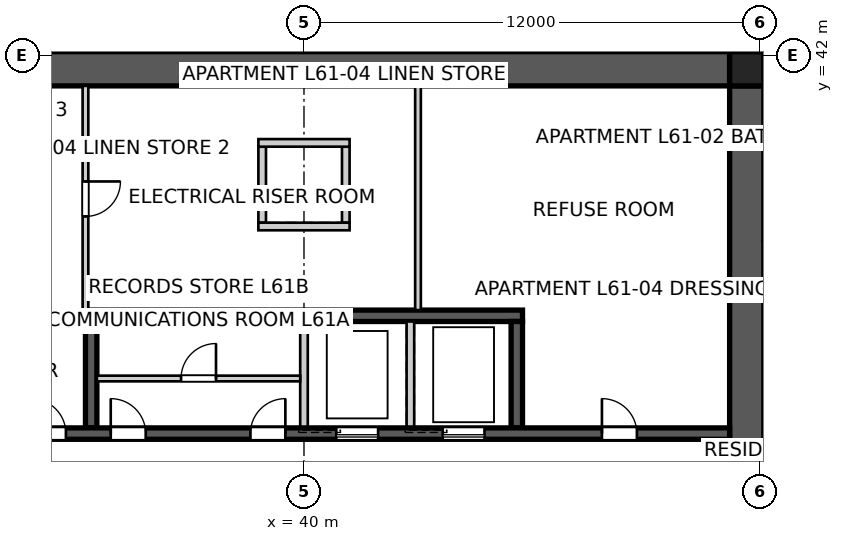
"""IFC4 building model, lengths in metres.
Left out: names, types, materials, properties, quantities, classifications, styles, units other than length and angle.
Written with IfcOpenShell. Run it as: python <this file> out.ifc"""

import sys

from ifc_helpers import new_model, si_unit, direction, frame, frame_2d, origin, origin_2d, place, context, subcontext, project, spatial, polyline, rectangle, outline, extrude, element, fill, save


model = new_model("IFC4")
c1 = context("Model", 3, precision=1e-05, world=origin(), true_north=direction((0.0, 1.0)))
c2 = subcontext(c1, "Body", "Model", "MODEL_VIEW")
j1 = project(units=[si_unit("LENGTHUNIT", "METRE"), si_unit("PLANEANGLEUNIT", "RADIAN")], contexts=[c1])
p1 = place(None, origin())
s1 = spatial("IfcSite", under=j1, at=p1, CompositionType="ELEMENT")
p2 = place(p1, origin())
s2 = spatial("IfcBuilding", under=s1, at=p2, CompositionType="ELEMENT")
p3 = place(p2, frame((0.0, 0.0, 221.8)))
s3 = spatial("IfcBuildingStorey", under=s2, at=p3, CompositionType="ELEMENT", Elevation=221.8)
p4 = place(p3, frame((28.8, 41.65, 0.0), z_axis=(0.0, 0.0, 1.0), x_axis=(1.0, 0.0, 0.0)))
e1 = element("IfcWall", 1, at=p4, inside=s3, PredefinedType="SHEAR", context=c2, shape_type="SweptSolid", body=[
    extrude(outline(polyline([(0.0, -0.45), (22.4, -0.45), (22.4, -0.025), (22.85, -0.025), (22.85, 0.025), (22.4, 0.025), (22.4, 0.45), (0.0, 0.45), (0.0, 0.025), (-0.45, 0.025), (-0.45, -0.025), (0.0, -0.025), (0.0, -0.45)])), origin(), (0.0, 0.0, 1.0), 3.4),
])
p5 = place(p3, frame((51.65, 18.8, 0.0), z_axis=(0.0, 0.0, 1.0), x_axis=(0.0, 1.0, 0.0)))
e2 = element("IfcWall", 2, at=p5, inside=s3, PredefinedType="SHEAR", context=c2, shape_type="SweptSolid", body=[
    extrude(outline(polyline([(0.0, -0.45), (22.4, -0.45), (22.4, -0.025), (22.85, -0.025), (22.85, 0.025), (22.4, 0.025), (22.4, 0.45), (0.0, 0.45), (0.0, 0.025), (-0.45, 0.025), (-0.45, -0.025), (0.0, -0.025), (0.0, -0.45)])), origin(), (0.0, 0.0, 1.0), 3.4),
])
p6 = place(p5, frame((11.14, 0.0, 0.0)))
e3 = element("IfcOpeningElement", 3, at=p6, cuts=e2, PredefinedType="OPENING", context=c2, shape_type="SweptSolid", body=[
    extrude(rectangle(XDim=1.02, YDim=2.4, at=frame_2d((0.51, 1.2))), frame((0.0, 0.46, 0.0), z_axis=(0.0, -1.0, 0.0), x_axis=(1.0, 0.0, 0.0)), (0.0, 0.0, 1.0), 0.92),
])
p7 = place(p3, frame((28.8, 32.05, 0.0), z_axis=(0.0, 0.0, 1.0), x_axis=(1.0, 0.0, 0.0)))
e4 = element("IfcWall", 4, at=p7, inside=s3, PredefinedType="SHEAR", context=c2, shape_type="SweptSolid", body=[
    extrude(rectangle(XDim=22.4, YDim=0.3, at=frame_2d((11.2, 0.0))), origin(), (0.0, 0.0, 1.0), 3.4),
])
p8 = place(p7, frame((19.04, 0.0, 0.0)))
e5 = element("IfcOpeningElement", 5, at=p8, cuts=e4, PredefinedType="OPENING", context=c2, shape_type="SweptSolid", body=[
    extrude(rectangle(XDim=0.92, YDim=2.1, at=frame_2d((0.46, 1.05))), frame((0.0, 0.16, 0.0), z_axis=(0.0, -1.0, 0.0), x_axis=(1.0, 0.0, 0.0)), (0.0, 0.0, 1.0), 0.32),
])
p9 = place(p7, frame((1.265, 0.0, 0.0)))
e6 = element("IfcOpeningElement", 6, at=p9, cuts=e4, PredefinedType="OPENING", context=c2, shape_type="SweptSolid", body=[
    extrude(rectangle(XDim=1.02, YDim=2.1, at=frame_2d((0.51, 1.05))), frame((0.0, 0.16, 0.0), z_axis=(0.0, -1.0, 0.0), x_axis=(1.0, 0.0, 0.0)), (0.0, 0.0, 1.0), 0.32),
])
p10 = place(p7, frame((4.015, 0.0, 0.0)))
e7 = element("IfcOpeningElement", 7, at=p10, cuts=e4, PredefinedType="OPENING", context=c2, shape_type="SweptSolid", body=[
    extrude(rectangle(XDim=0.92, YDim=2.1, at=frame_2d((0.46, 1.05))), frame((0.0, 0.16, 0.0), z_axis=(0.0, -1.0, 0.0), x_axis=(1.0, 0.0, 0.0)), (0.0, 0.0, 1.0), 0.32),
])
p11 = place(p7, frame((6.115, 0.0, 0.0)))
e8 = element("IfcOpeningElement", 8, at=p11, cuts=e4, PredefinedType="OPENING", context=c2, shape_type="SweptSolid", body=[
    extrude(rectangle(XDim=0.92, YDim=2.1, at=frame_2d((0.46, 1.05))), frame((0.0, 0.16, 0.0), z_axis=(0.0, -1.0, 0.0), x_axis=(1.0, 0.0, 0.0)), (0.0, 0.0, 1.0), 0.32),
])
p12 = place(p7, frame((9.79, 0.0, 0.0)))
e9 = element("IfcOpeningElement", 9, at=p12, cuts=e4, PredefinedType="OPENING", context=c2, shape_type="SweptSolid", body=[
    extrude(rectangle(XDim=0.92, YDim=2.1, at=frame_2d((0.46, 1.05))), frame((0.0, 0.16, 0.0), z_axis=(0.0, -1.0, 0.0), x_axis=(1.0, 0.0, 0.0)), (0.0, 0.0, 1.0), 0.32),
])
p13 = place(p7, frame((12.05, 0.0, 0.0)))
e10 = element("IfcOpeningElement", 10, at=p13, cuts=e4, PredefinedType="OPENING", context=c2, shape_type="SweptSolid", body=[
    extrude(rectangle(XDim=1.1, YDim=2.1, at=frame_2d((0.55, 1.05))), frame((0.0, 0.16, 0.0), z_axis=(0.0, -1.0, 0.0), x_axis=(1.0, 0.0, 0.0)), (0.0, 0.0, 1.0), 0.32),
])
p14 = place(p7, frame((14.85, 0.0, 0.0)))
e11 = element("IfcOpeningElement", 11, at=p14, cuts=e4, PredefinedType="OPENING", context=c2, shape_type="SweptSolid", body=[
    extrude(rectangle(XDim=1.1, YDim=2.1, at=frame_2d((0.55, 1.05))), frame((0.0, 0.16, 0.0), z_axis=(0.0, -1.0, 0.0), x_axis=(1.0, 0.0, 0.0)), (0.0, 0.0, 1.0), 0.32),
])
p15 = place(p3, frame((34.25, 35.15, 0.0), z_axis=(0.0, 0.0, 1.0), x_axis=(1.0, 0.0, 0.0)))
e12 = element("IfcWall", 12, at=p15, inside=s3, PredefinedType="SHEAR", context=c2, shape_type="SweptSolid", body=[
    extrude(rectangle(XDim=11.5, YDim=0.3, at=frame_2d((5.75, 0.0))), origin(), (0.0, 0.0, 1.0), 3.4),
])
p16 = place(p3, frame((34.4, 32.2, 0.0), z_axis=(0.0, 0.0, 1.0), x_axis=(0.0, 1.0, 0.0)))
e13 = element("IfcWall", 13, at=p16, inside=s3, PredefinedType="SHEAR", context=c2, shape_type="SweptSolid", body=[
    extrude(rectangle(XDim=2.8, YDim=0.3, at=frame_2d((1.4, 0.0))), origin(), (0.0, 0.0, 1.0), 3.4),
])
for number, where, z_axis, x_axis in (
    (14, (40.0, 32.2, 0.0), (0.0, 0.0, 1.0), (0.0, 1.0, 0.0)),
    (15, (42.8, 32.2, 0.0), (0.0, 0.0, 1.0), (0.0, 1.0, 0.0)),
):
    element("IfcWall", number, at=place(p3, frame(where, z_axis=z_axis, x_axis=x_axis)), inside=s3, PredefinedType="SOLIDWALL", context=c2, shape_type="SweptSolid", body=[
        extrude(rectangle(XDim=2.8, YDim=0.2, at=frame_2d((1.4, 0.0))), origin(), (0.0, 0.0, 1.0), 3.4),
    ])
p17 = place(p3, frame((45.6, 32.2, 0.0), z_axis=(0.0, 0.0, 1.0), x_axis=(0.0, 1.0, 0.0)))
e16 = element("IfcWall", 16, at=p17, inside=s3, PredefinedType="SHEAR", context=c2, shape_type="SweptSolid", body=[
    extrude(rectangle(XDim=2.8, YDim=0.3, at=frame_2d((1.4, 0.0))), origin(), (0.0, 0.0, 1.0), 3.4),
])
for number, where, z_axis, x_axis in (
    (17, (38.9, 37.6, 0.0), (0.0, 0.0, 1.0), (0.0, 1.0, 0.0)),
    (18, (41.1, 37.6, 0.0), (0.0, 0.0, 1.0), (0.0, 1.0, 0.0)),
):
    element("IfcWall", number, at=place(p3, frame(where, z_axis=z_axis, x_axis=x_axis)), inside=s3, PredefinedType="SOLIDWALL", context=c2, shape_type="SweptSolid", body=[
        extrude(rectangle(XDim=2.0, YDim=0.2, at=frame_2d((1.0, 0.0))), origin(), (0.0, 0.0, 1.0), 3.4),
    ])
for number, where, z_axis, x_axis in (
    (19, (38.8, 37.5, 0.0), (0.0, 0.0, 1.0), (1.0, 0.0, 0.0)),
    (20, (38.8, 39.7, 0.0), (0.0, 0.0, 1.0), (1.0, 0.0, 0.0)),
):
    element("IfcWall", number, at=place(p3, frame(where, z_axis=z_axis, x_axis=x_axis)), inside=s3, PredefinedType="SOLIDWALL", context=c2, shape_type="SweptSolid", body=[
        extrude(rectangle(XDim=2.4, YDim=0.2, at=frame_2d((1.2, 0.0))), origin(), (0.0, 0.0, 1.0), 3.4),
    ])
p18 = place(p3, frame((51.65, 41.65, 0.0), z_axis=(0.0, 0.0, 1.0), x_axis=(1.0, 0.0, 0.0)))
e21 = element("IfcColumn", 21, at=p18, inside=s3, PredefinedType="COLUMN", context=c2, shape_type="SweptSolid", body=[
    extrude(rectangle(XDim=0.9, YDim=0.9, at=origin_2d()), origin(), (0.0, 0.0, 1.0), 3.4),
])
p19 = place(p3, frame((59.486, 41.25, 0.0), z_axis=(0.0, 0.0, 1.0), x_axis=(-0.866020489494, -0.500008511703, 0.0)))
e22 = element("IfcWall", 22, at=p19, inside=s3, PredefinedType="PARTITIONING", context=c2, shape_type="SweptSolid", body=[
    extrude(rectangle(XDim=8.496, YDim=0.25, at=frame_2d((4.248, 0.0))), origin(), (0.0, 0.0, 1.0), 3.25),
])
p20 = place(p3, frame((34.25, 41.2, 0.0), z_axis=(0.0, 0.0, 1.0), x_axis=(0.0, -1.0, 0.0)))
e23 = element("IfcWall", 23, at=p20, inside=s3, PredefinedType="SOLIDWALL", context=c2, shape_type="SweptSolid", body=[
    extrude(rectangle(XDim=5.95, YDim=0.15, at=frame_2d((2.975, 0.0))), origin(), (0.0, 0.0, 1.0), 3.25),
])
p21 = place(p20, frame((2.515, 0.0, 0.0)))
e24 = element("IfcOpeningElement", 24, at=p21, cuts=e23, PredefinedType="OPENING", context=c2, shape_type="SweptSolid", body=[
    extrude(rectangle(XDim=0.92, YDim=2.1, at=frame_2d((0.46, 1.05))), frame((0.0, 0.085, 0.0), z_axis=(0.0, -1.0, 0.0), x_axis=(1.0, 0.0, 0.0)), (0.0, 0.0, 1.0), 0.17),
])
p22 = place(p3, frame((43.0, 41.2, 0.0), z_axis=(0.0, 0.0, 1.0), x_axis=(0.0, -1.0, 0.0)))
e25 = element("IfcWall", 25, at=p22, inside=s3, PredefinedType="SOLIDWALL", context=c2, shape_type="SweptSolid", body=[
    extrude(rectangle(XDim=5.9, YDim=0.15, at=frame_2d((2.95, 0.0))), origin(), (0.0, 0.0, 1.0), 3.25),
])
p23 = place(p3, frame((52.1, 41.18, 0.0), z_axis=(0.0, 0.0, 1.0), x_axis=(0.0, 1.0, 0.0)))
e26 = element("IfcWall", 26, at=p23, inside=s3, PredefinedType="PARTITIONING", context=c2, shape_type="SweptSolid", body=[
    extrude(rectangle(XDim=0.898, YDim=0.12, at=frame_2d((0.449, 0.0))), origin(), (0.0, 0.0, 1.0), 3.25),
])
p24 = place(p3, frame((51.906, 42.1, 0.0), z_axis=(0.0, 0.0, 1.0), x_axis=(0.993387055489, -0.114813579278, 0.0)))
e27 = element("IfcWall", 27, at=p24, inside=s3, PredefinedType="PARTITIONING", context=c2, shape_type="SweptSolid", body=[
    extrude(rectangle(XDim=0.196, YDim=0.12, at=frame_2d((0.098, 0.0))), origin(), (0.0, 0.0, 1.0), 3.25),
])
p25 = place(p3, frame((34.55, 33.5, 0.0), z_axis=(0.0, 0.0, 1.0), x_axis=(1.0, 0.0, 0.0)))
e28 = element("IfcWall", 28, at=p25, inside=s3, PredefinedType="SOLIDWALL", context=c2, shape_type="SweptSolid", body=[
    extrude(rectangle(XDim=5.35, YDim=0.15, at=frame_2d((2.675, 0.0))), origin(), (0.0, 0.0, 1.0), 3.25),
])
p26 = place(p25, frame((2.215, 0.0, 0.0)))
e29 = element("IfcOpeningElement", 29, at=p26, cuts=e28, PredefinedType="OPENING", context=c2, shape_type="SweptSolid", body=[
    extrude(rectangle(XDim=0.92, YDim=2.1, at=frame_2d((0.46, 1.05))), frame((0.0, 0.085, 0.0), z_axis=(0.0, -1.0, 0.0), x_axis=(1.0, 0.0, 0.0)), (0.0, 0.0, 1.0), 0.17),
])
p27 = place(p8, origin())
e30 = element("IfcDoor", 30, at=p27, inside=s3, OperationType="SINGLE_SWING_LEFT", PredefinedType="DOOR", context=c2, shape_type="SweptSolid", body=[
    extrude(rectangle(XDim=0.92, YDim=2.1, at=frame_2d((0.46, 1.05))), frame((0.0, 0.025, 0.0), z_axis=(0.0, -1.0, 0.0), x_axis=(1.0, 0.0, 0.0)), (0.0, 0.0, 1.0), 0.05),
])
fill(e5, e30)
p28 = place(p10, origin())
e31 = element("IfcDoor", 31, at=p28, inside=s3, OperationType="SINGLE_SWING_LEFT", PredefinedType="DOOR", context=c2, shape_type="SweptSolid", body=[
    extrude(rectangle(XDim=0.92, YDim=2.1, at=frame_2d((0.46, 1.05))), frame((0.0, 0.025, 0.0), z_axis=(0.0, -1.0, 0.0), x_axis=(1.0, 0.0, 0.0)), (0.0, 0.0, 1.0), 0.05),
])
fill(e7, e31)
p29 = place(p21, origin())
e32 = element("IfcDoor", 32, at=p29, inside=s3, OperationType="SINGLE_SWING_LEFT", PredefinedType="DOOR", context=c2, shape_type="SweptSolid", body=[
    extrude(rectangle(XDim=0.92, YDim=2.1, at=frame_2d((0.46, 1.05))), frame((0.0, 0.025, 0.0), z_axis=(0.0, -1.0, 0.0), x_axis=(1.0, 0.0, 0.0)), (0.0, 0.0, 1.0), 0.05),
])
fill(e24, e32)
p30 = place(p11, origin())
e33 = element("IfcDoor", 33, at=p30, inside=s3, OperationType="SINGLE_SWING_LEFT", PredefinedType="DOOR", context=c2, shape_type="SweptSolid", body=[
    extrude(rectangle(XDim=0.92, YDim=2.1, at=frame_2d((0.46, 1.05))), frame((0.0, 0.025, 0.0), z_axis=(0.0, -1.0, 0.0), x_axis=(1.0, 0.0, 0.0)), (0.0, 0.0, 1.0), 0.05),
])
fill(e8, e33)
p31 = place(p12, origin())
e34 = element("IfcDoor", 34, at=p31, inside=s3, OperationType="SINGLE_SWING_RIGHT", PredefinedType="DOOR", context=c2, shape_type="SweptSolid", body=[
    extrude(rectangle(XDim=0.92, YDim=2.1, at=frame_2d((0.46, 1.05))), frame((0.0, 0.025, 0.0), z_axis=(0.0, -1.0, 0.0), x_axis=(1.0, 0.0, 0.0)), (0.0, 0.0, 1.0), 0.05),
])
fill(e9, e34)
p32 = place(p26, origin())
e35 = element("IfcDoor", 35, at=p32, inside=s3, OperationType="SINGLE_SWING_RIGHT", PredefinedType="DOOR", context=c2, shape_type="SweptSolid", body=[
    extrude(rectangle(XDim=0.92, YDim=2.1, at=frame_2d((0.46, 1.05))), frame((0.0, 0.025, 0.0), z_axis=(0.0, -1.0, 0.0), x_axis=(1.0, 0.0, 0.0)), (0.0, 0.0, 1.0), 0.05),
])
fill(e29, e35)
p33 = place(p13, origin())
e36 = element("IfcDoor", 36, at=p33, inside=s3, OperationType="SLIDING_TO_LEFT", PredefinedType="DOOR", context=c2, shape_type="SweptSolid", body=[
    extrude(rectangle(XDim=1.1, YDim=2.1, at=frame_2d((0.55, 1.05))), frame((0.0, 0.025, 0.0), z_axis=(0.0, -1.0, 0.0), x_axis=(1.0, 0.0, 0.0)), (0.0, 0.0, 1.0), 0.05),
])
fill(e10, e36)
p34 = place(p14, origin())
e37 = element("IfcDoor", 37, at=p34, inside=s3, OperationType="SLIDING_TO_LEFT", PredefinedType="DOOR", context=c2, shape_type="SweptSolid", body=[
    extrude(rectangle(XDim=1.1, YDim=2.1, at=frame_2d((0.55, 1.05))), frame((0.0, 0.025, 0.0), z_axis=(0.0, -1.0, 0.0), x_axis=(1.0, 0.0, 0.0)), (0.0, 0.0, 1.0), 0.05),
])
fill(e11, e37)
save(model, sys.argv[1])
